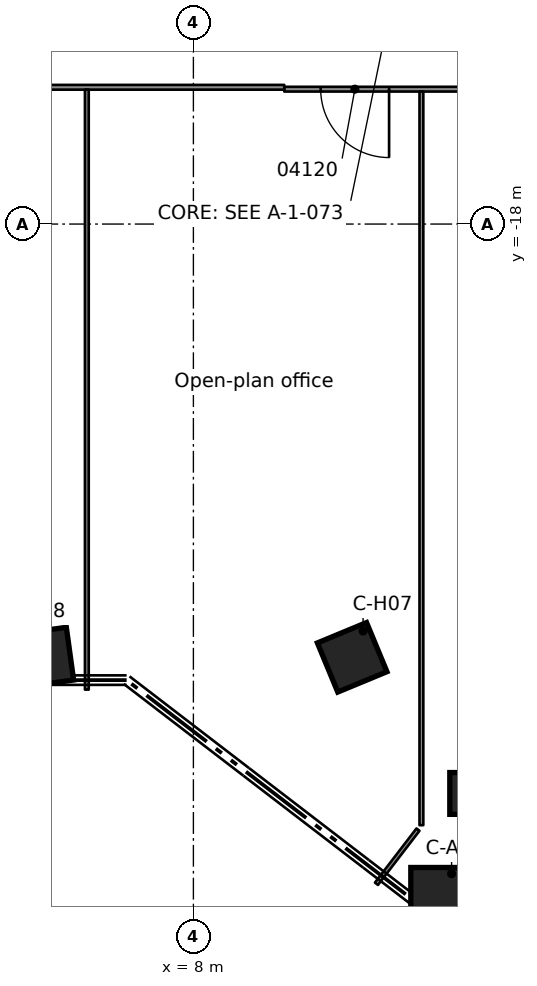
"""IFC4 building model, lengths in metres.
Left out: names, types, materials, properties, quantities, classifications, styles, units other than length and angle.
Written with IfcOpenShell. Run it as: python <this file> out.ifc"""

import sys

from ifc_helpers import new_model, si_unit, direction, frame, frame_2d, origin, origin_2d, place, context, subcontext, project, spatial, rectangle, extrude, element, fill, save


model = new_model("IFC4")
c1 = context("Model", 3, precision=1e-05, world=origin(), true_north=direction((0.0, 1.0)))
c2 = subcontext(c1, "Body", "Model", "MODEL_VIEW")
j1 = project(units=[si_unit("LENGTHUNIT", "METRE"), si_unit("PLANEANGLEUNIT", "RADIAN")], contexts=[c1])
p1 = place(None, origin())
s1 = spatial("IfcSite", under=j1, at=p1, CompositionType="ELEMENT")
p2 = place(p1, origin())
s2 = spatial("IfcBuilding", under=s1, at=p2, CompositionType="ELEMENT")
p3 = place(p2, frame((0.0, 0.0, 20.5)))
s3 = spatial("IfcBuildingStorey", under=s2, at=p3, CompositionType="ELEMENT", Elevation=20.5)
for number, where, z_axis, x_axis in (
    (1, (14.371, -35.48, 0.0), (0.0, 0.0, 1.0), (1.0, 0.0, 0.0)),
    (2, (15.397, -32.982, 0.0), (0.0, 0.0, 1.0), (1.0, 0.0, 0.0)),
):
    element("IfcColumn", number, at=place(p3, frame(where, z_axis=z_axis, x_axis=x_axis)), inside=s3, PredefinedType="COLUMN", context=c2, shape_type="SweptSolid", body=[
        extrude(rectangle(XDim=1.3, YDim=1.1, at=origin_2d()), origin(), (0.0, 0.0, 1.0), 4.6),
    ])
for number, where, z_axis, x_axis in (
    (3, (12.178, -29.4, 0.0), (0.0, 0.0, 1.0), (0.383, -0.924, 0.0)),
    (4, (4.059, -29.4, 0.0), (0.0, 0.0, 1.0), (0.137, -0.991, 0.0)),
):
    element("IfcColumn", number, at=place(p3, frame(where, z_axis=z_axis, x_axis=x_axis)), inside=s3, PredefinedType="COLUMN", context=c2, shape_type="SweptSolid", body=[
        extrude(rectangle(XDim=1.4, YDim=1.4, at=origin_2d()), origin(), (0.0, 0.0, 1.0), 4.6),
    ])
p4 = place(p3, frame((21.387, -14.451, 0.0), z_axis=(0.0, 0.0, 1.0), x_axis=(-1.0, 0.0, 0.0)))
e5 = element("IfcWall", 5, at=p4, inside=s3, PredefinedType="PARTITIONING", context=c2, shape_type="SweptSolid", body=[
    extrude(rectangle(XDim=10.996, YDim=0.125, at=frame_2d((5.498, 0.0))), origin(), (0.0, 0.0, 1.0), 4.16),
])
p5 = place(p4, frame((8.238, 0.0, 0.0)))
e6 = element("IfcOpeningElement", 6, at=p5, cuts=e5, PredefinedType="OPENING", context=c2, shape_type="SweptSolid", body=[
    extrude(rectangle(XDim=1.8, YDim=2.1, at=frame_2d((0.9, 1.05))), frame((0.0, 0.073, 0.0), z_axis=(0.0, -1.0, 0.0), x_axis=(1.0, 0.0, 0.0)), (0.0, 0.0, 1.0), 0.145),
])
p6 = place(p4, frame((2.538, 0.0, 0.0)))
e7 = element("IfcOpeningElement", 7, at=p6, cuts=e5, PredefinedType="OPENING", context=c2, shape_type="SweptSolid", body=[
    extrude(rectangle(XDim=2.1, YDim=2.1, at=frame_2d((1.05, 1.05))), frame((0.0, 0.073, 0.0), z_axis=(0.0, -1.0, 0.0), x_axis=(1.0, 0.0, 0.0)), (0.0, 0.0, 1.0), 0.145),
])
p7 = place(p3, frame((10.391, -14.401, 0.0), z_axis=(0.0, 0.0, 1.0), x_axis=(-1.0, 0.0, 0.0)))
e8 = element("IfcWall", 8, at=p7, inside=s3, PredefinedType="PARTITIONING", context=c2, shape_type="SweptSolid", body=[
    extrude(rectangle(XDim=20.781, YDim=0.125, at=frame_2d((10.391, 0.0))), origin(), (0.0, 0.0, 1.0), 4.16),
])
p8 = place(p7, frame((12.491, 0.0, 0.0)))
e9 = element("IfcOpeningElement", 9, at=p8, cuts=e8, PredefinedType="OPENING", context=c2, shape_type="SweptSolid", body=[
    extrude(rectangle(XDim=0.9, YDim=2.1, at=frame_2d((0.45, 1.05))), frame((0.0, 0.073, 0.0), z_axis=(0.0, -1.0, 0.0), x_axis=(1.0, 0.0, 0.0)), (0.0, 0.0, 1.0), 0.145),
])
p9 = place(p7, frame((7.295, 0.0, 0.0)))
e10 = element("IfcOpeningElement", 10, at=p9, cuts=e8, PredefinedType="OPENING", context=c2, shape_type="SweptSolid", body=[
    extrude(rectangle(XDim=0.9, YDim=2.1, at=frame_2d((0.45, 1.05))), frame((0.0, 0.073, 0.0), z_axis=(0.0, -1.0, 0.0), x_axis=(1.0, 0.0, 0.0)), (0.0, 0.0, 1.0), 0.145),
])
p10 = place(p3, frame((12.817, -35.359, 0.0), z_axis=(0.0, 0.0, 1.0), x_axis=(0.608665559583, 0.793426894287, 0.0)))
e11 = element("IfcWall", 11, at=p10, inside=s3, PredefinedType="PARTITIONING", context=c2, shape_type="SweptSolid", body=[
    extrude(rectangle(XDim=1.796, YDim=0.1, at=frame_2d((0.898, 0.0))), origin(), (0.0, 0.0, 1.0), 4.16),
])
p11 = place(p3, frame((14.0, -33.817, 0.0), z_axis=(0.0, 0.0, 1.0), x_axis=(0.0, 1.0, 0.0)))
e12 = element("IfcWall", 12, at=p11, inside=s3, PredefinedType="PARTITIONING", context=c2, shape_type="SweptSolid", body=[
    extrude(rectangle(XDim=19.303, YDim=0.1, at=frame_2d((9.651, 0.0))), origin(), (0.0, 0.0, 1.0), 4.16),
])
p12 = place(p3, frame((5.196, -30.25, 0.0), z_axis=(0.0, 0.0, 1.0), x_axis=(0.0, 1.0, 0.0)))
e13 = element("IfcWall", 13, at=p12, inside=s3, PredefinedType="PARTITIONING", context=c2, shape_type="SweptSolid", body=[
    extrude(rectangle(XDim=15.787, YDim=0.1, at=frame_2d((7.894, 0.0))), origin(), (0.0, 0.0, 1.0), 4.16),
])
p13 = place(p5, origin())
e14 = element("IfcDoor", 14, at=p13, inside=s3, OperationType="DOUBLE_DOOR_SINGLE_SWING", PredefinedType="DOOR", context=c2, shape_type="SweptSolid", body=[
    extrude(rectangle(XDim=1.8, YDim=2.1, at=frame_2d((0.9, 1.05))), frame((0.0, 0.025, 0.0), z_axis=(0.0, -1.0, 0.0), x_axis=(1.0, 0.0, 0.0)), (0.0, 0.0, 1.0), 0.05),
])
fill(e6, e14)
save(model, sys.argv[1])
